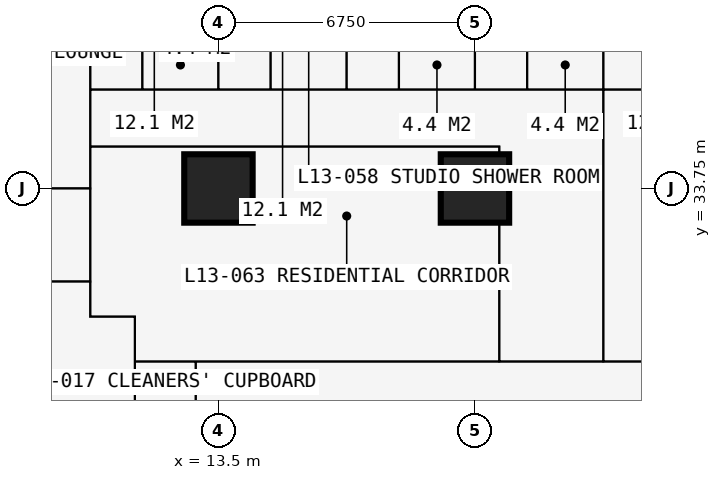
"""IFC4 building model, lengths in metres.
Left out: names, types, materials, properties, quantities, classifications, styles, units other than length and angle.
Written with IfcOpenShell. Run it as: python <this file> out.ifc"""

import sys

from ifc_helpers import new_model, si_unit, direction, frame, frame_2d, origin, origin_2d, place, context, subcontext, project, spatial, rectangle, extrude, element, fill, save


model = new_model("IFC4")
c1 = context("Model", 3, precision=1e-05, world=origin(), true_north=direction((0.0, 1.0)))
c2 = subcontext(c1, "Body", "Model", "MODEL_VIEW")
j1 = project(units=[si_unit("LENGTHUNIT", "METRE"), si_unit("PLANEANGLEUNIT", "RADIAN")], contexts=[c1])
p1 = place(None, origin())
s1 = spatial("IfcSite", under=j1, at=p1, CompositionType="ELEMENT")
p2 = place(p1, origin())
s2 = spatial("IfcBuilding", under=s1, at=p2, CompositionType="ELEMENT")
p3 = place(p2, frame((0.0, 0.0, 50.4)))
s3 = spatial("IfcBuildingStorey", under=s2, at=p3, CompositionType="ELEMENT", Elevation=50.4)
for number, where, z_axis, x_axis in (
    (1, (13.5, 33.75, 0.0), (0.0, 0.0, 1.0), (1.0, 0.0, 0.0)),
    (2, (20.25, 33.75, 0.0), (0.0, 0.0, 1.0), (1.0, 0.0, 0.0)),
):
    element("IfcColumn", number, at=place(p3, frame(where, z_axis=z_axis, x_axis=x_axis)), inside=s3, PredefinedType="COLUMN", context=c2, shape_type="SweptSolid", body=[
        extrude(rectangle(XDim=1.8, YDim=1.8, at=origin_2d()), origin(), (0.0, 0.0, 1.0), 3.6),
    ])
p4 = place(p3, frame((-0.734, 33.75, 0.0), z_axis=(0.0, 0.0, 1.0), x_axis=(1.0, 0.0, 0.0)))
e3 = element("IfcWall", 3, at=p4, inside=s3, PredefinedType="PARTITIONING", context=c2, shape_type="SweptSolid", body=[
    extrude(rectangle(XDim=10.859, YDim=0.15, at=frame_2d((5.429, 0.0))), origin(), (0.0, 0.0, 1.0), 2.877),
])
p5 = place(p3, frame((5.65, 31.3, 0.0), z_axis=(0.0, 0.0, 1.0), x_axis=(1.0, 0.0, 0.0)))
e4 = element("IfcWall", 4, at=p5, inside=s3, PredefinedType="PARTITIONING", context=c2, shape_type="SweptSolid", body=[
    extrude(rectangle(XDim=4.475, YDim=0.15, at=frame_2d((2.238, 0.0))), origin(), (0.0, 0.0, 1.0), 3.375),
])
p6 = place(p3, frame((10.125, 30.375, 0.0), z_axis=(0.0, 0.0, 1.0), x_axis=(0.0, 1.0, 0.0)))
e5 = element("IfcWall", 5, at=p6, inside=s3, PredefinedType="PARTITIONING", context=c2, shape_type="SweptSolid", body=[
    extrude(rectangle(XDim=10.859, YDim=0.15, at=frame_2d((5.429, 0.0))), origin(), (0.0, 0.0, 1.0), 3.375),
])
p7 = place(p6, frame((4.725, 0.0, 0.0)))
e6 = element("IfcOpeningElement", 6, at=p7, cuts=e5, PredefinedType="OPENING", context=c2, shape_type="SweptSolid", body=[
    extrude(rectangle(XDim=1.0, YDim=2.2, at=frame_2d((0.5, 1.1))), frame((0.0, 0.085, 0.0), z_axis=(0.0, -1.0, 0.0), x_axis=(1.0, 0.0, 0.0)), (0.0, 0.0, 1.0), 0.17),
])
p8 = place(p3, frame((10.125, 30.375, 0.0), z_axis=(0.0, 0.0, 1.0), x_axis=(1.0, 0.0, 0.0)))
e7 = element("IfcWall", 7, at=p8, inside=s3, PredefinedType="PARTITIONING", context=c2, shape_type="SweptSolid", body=[
    extrude(rectangle(XDim=1.175, YDim=0.15, at=frame_2d((0.587, 0.0))), origin(), (0.0, 0.0, 1.0), 3.375),
])
p9 = place(p3, frame((10.125, 34.85, 0.0), z_axis=(0.0, 0.0, 1.0), x_axis=(1.0, 0.0, 0.0)))
e8 = element("IfcWall", 8, at=p9, inside=s3, PredefinedType="PARTITIONING", context=c2, shape_type="SweptSolid", body=[
    extrude(rectangle(XDim=10.762, YDim=0.15, at=frame_2d((5.381, 0.0))), origin(), (0.0, 0.0, 1.0), 3.375),
])
p10 = place(p9, frame((4.9, 0.0, 0.0)))
e9 = element("IfcOpeningElement", 9, at=p10, cuts=e8, PredefinedType="OPENING", context=c2, shape_type="SweptSolid", body=[
    extrude(rectangle(XDim=0.95, YDim=2.2, at=frame_2d((0.475, 1.1))), frame((0.0, 0.085, 0.0), z_axis=(0.0, -1.0, 0.0), x_axis=(1.0, 0.0, 0.0)), (0.0, 0.0, 1.0), 0.17),
])
p11 = place(p3, frame((10.125, 36.35, 0.0), z_axis=(0.0, 0.0, 1.0), x_axis=(1.0, 0.0, 0.0)))
e10 = element("IfcWall", 10, at=p11, inside=s3, PredefinedType="PARTITIONING", context=c2, shape_type="SweptSolid", body=[
    extrude(rectangle(XDim=23.625, YDim=0.1, at=frame_2d((11.812, 0.0))), origin(), (0.0, 0.0, 1.0), 3.375),
])
p12 = place(p11, frame((21.45, 0.0, 0.0)))
e11 = element("IfcOpeningElement", 11, at=p12, cuts=e10, PredefinedType="OPENING", context=c2, shape_type="SweptSolid", body=[
    extrude(rectangle(XDim=1.0, YDim=2.2, at=frame_2d((0.5, 1.1))), frame((0.0, 0.06, 0.0), z_axis=(0.0, -1.0, 0.0), x_axis=(1.0, 0.0, 0.0)), (0.0, 0.0, 1.0), 0.12),
])
p13 = place(p11, frame((17.125, 0.0, 0.0)))
e12 = element("IfcOpeningElement", 12, at=p13, cuts=e10, PredefinedType="OPENING", context=c2, shape_type="SweptSolid", body=[
    extrude(rectangle(XDim=0.95, YDim=2.2, at=frame_2d((0.475, 1.1))), frame((0.0, 0.06, 0.0), z_axis=(0.0, -1.0, 0.0), x_axis=(1.0, 0.0, 0.0)), (0.0, 0.0, 1.0), 0.12),
])
p14 = place(p11, frame((13.7, 0.0, 0.0)))
e13 = element("IfcOpeningElement", 13, at=p14, cuts=e10, PredefinedType="OPENING", context=c2, shape_type="SweptSolid", body=[
    extrude(rectangle(XDim=0.95, YDim=2.2, at=frame_2d((0.475, 1.1))), frame((0.0, 0.06, 0.0), z_axis=(0.0, -1.0, 0.0), x_axis=(1.0, 0.0, 0.0)), (0.0, 0.0, 1.0), 0.12),
])
p15 = place(p11, frame((0.2, 0.0, 0.0)))
e14 = element("IfcOpeningElement", 14, at=p15, cuts=e10, PredefinedType="OPENING", context=c2, shape_type="SweptSolid", body=[
    extrude(rectangle(XDim=0.95, YDim=2.2, at=frame_2d((0.475, 1.1))), frame((0.0, 0.06, 0.0), z_axis=(0.0, -1.0, 0.0), x_axis=(1.0, 0.0, 0.0)), (0.0, 0.0, 1.0), 0.12),
])
p16 = place(p11, frame((3.625, 0.0, 0.0)))
e15 = element("IfcOpeningElement", 15, at=p16, cuts=e10, PredefinedType="OPENING", context=c2, shape_type="SweptSolid", body=[
    extrude(rectangle(XDim=0.95, YDim=2.2, at=frame_2d((0.475, 1.1))), frame((0.0, 0.06, 0.0), z_axis=(0.0, -1.0, 0.0), x_axis=(1.0, 0.0, 0.0)), (0.0, 0.0, 1.0), 0.12),
])
p17 = place(p11, frame((7.0, 0.0, 0.0)))
e16 = element("IfcOpeningElement", 16, at=p17, cuts=e10, PredefinedType="OPENING", context=c2, shape_type="SweptSolid", body=[
    extrude(rectangle(XDim=0.95, YDim=2.2, at=frame_2d((0.475, 1.1))), frame((0.0, 0.06, 0.0), z_axis=(0.0, -1.0, 0.0), x_axis=(1.0, 0.0, 0.0)), (0.0, 0.0, 1.0), 0.12),
])
p18 = place(p11, frame((10.375, 0.0, 0.0)))
e17 = element("IfcOpeningElement", 17, at=p18, cuts=e10, PredefinedType="OPENING", context=c2, shape_type="SweptSolid", body=[
    extrude(rectangle(XDim=0.95, YDim=2.2, at=frame_2d((0.475, 1.1))), frame((0.0, 0.06, 0.0), z_axis=(0.0, -1.0, 0.0), x_axis=(1.0, 0.0, 0.0)), (0.0, 0.0, 1.0), 0.12),
])
p19 = place(p3, frame((11.3, 11.3, 0.0), z_axis=(0.0, 0.0, 1.0), x_axis=(0.0, 1.0, 0.0)))
e18 = element("IfcWall", 18, at=p19, inside=s3, PredefinedType="PARTITIONING", context=c2, shape_type="SweptSolid", body=[
    extrude(rectangle(XDim=19.075, YDim=0.15, at=frame_2d((9.538, 0.0))), origin(), (0.0, 0.0, 1.0), 3.375),
])
p20 = place(p19, frame((10.137, 0.0, 0.0)))
e19 = element("IfcOpeningElement", 19, at=p20, cuts=e18, PredefinedType="OPENING", context=c2, shape_type="SweptSolid", body=[
    extrude(rectangle(XDim=1.0, YDim=2.2, at=frame_2d((0.5, 1.1))), frame((0.0, 0.085, 0.0), z_axis=(0.0, -1.0, 0.0), x_axis=(1.0, 0.0, 0.0)), (0.0, 0.0, 1.0), 0.17),
])
p21 = place(p3, frame((11.3, 29.2, 0.0), z_axis=(0.0, 0.0, 1.0), x_axis=(1.0, 0.0, 0.0)))
e20 = element("IfcWall", 20, at=p21, inside=s3, PredefinedType="PARTITIONING", context=c2, shape_type="SweptSolid", body=[
    extrude(rectangle(XDim=19.075, YDim=0.15, at=frame_2d((9.538, 0.0))), origin(), (0.0, 0.0, 1.0), 3.375),
])
p22 = place(p21, frame((12.875, 0.0, 0.0)))
e21 = element("IfcOpeningElement", 21, at=p22, cuts=e20, PredefinedType="OPENING", context=c2, shape_type="SweptSolid", body=[
    extrude(rectangle(XDim=1.0, YDim=2.2, at=frame_2d((0.5, 1.1))), frame((0.0, 0.085, 0.0), z_axis=(0.0, -1.0, 0.0), x_axis=(1.0, 0.0, 0.0)), (0.0, 0.0, 1.0), 0.17),
])
p23 = place(p21, frame((10.438, 0.0, 0.0)))
e22 = element("IfcOpeningElement", 22, at=p23, cuts=e20, PredefinedType="OPENING", context=c2, shape_type="SweptSolid", body=[
    extrude(rectangle(XDim=1.0, YDim=2.2, at=frame_2d((0.5, 1.1))), frame((0.0, 0.085, 0.0), z_axis=(0.0, -1.0, 0.0), x_axis=(1.0, 0.0, 0.0)), (0.0, 0.0, 1.0), 0.17),
])
p24 = place(p21, frame((15.675, 0.0, 0.0)))
e23 = element("IfcOpeningElement", 23, at=p24, cuts=e20, PredefinedType="OPENING", context=c2, shape_type="SweptSolid", body=[
    extrude(rectangle(XDim=0.95, YDim=2.2, at=frame_2d((0.475, 1.1))), frame((0.0, 0.085, 0.0), z_axis=(0.0, -1.0, 0.0), x_axis=(1.0, 0.0, 0.0)), (0.0, 0.0, 1.0), 0.17),
])
p25 = place(p3, frame((11.5, 36.35, 0.0), z_axis=(0.0, 0.0, 1.0), x_axis=(0.0, 1.0, 0.0)))
e24 = element("IfcWall", 24, at=p25, inside=s3, PredefinedType="PARTITIONING", context=c2, shape_type="SweptSolid", body=[
    extrude(rectangle(XDim=2.2, YDim=0.1, at=frame_2d((1.1, 0.0))), origin(), (0.0, 0.0, 1.0), 3.375),
])
p26 = place(p25, frame((0.65, 0.0, 0.0)))
e25 = element("IfcOpeningElement", 25, at=p26, cuts=e24, PredefinedType="OPENING", context=c2, shape_type="SweptSolid", body=[
    extrude(rectangle(XDim=0.9, YDim=2.2, at=frame_2d((0.45, 1.1))), frame((0.0, 0.06, 0.0), z_axis=(0.0, -1.0, 0.0), x_axis=(1.0, 0.0, 0.0)), (0.0, 0.0, 1.0), 0.12),
])
p27 = place(p3, frame((12.9, 27.6, 0.0), z_axis=(0.0, 0.0, 1.0), x_axis=(0.0, 1.0, 0.0)))
e26 = element("IfcWall", 26, at=p27, inside=s3, PredefinedType="PARTITIONING", context=c2, shape_type="SweptSolid", body=[
    extrude(rectangle(XDim=1.6, YDim=0.15, at=frame_2d((0.8, 0.0))), origin(), (0.0, 0.0, 1.0), 3.375),
])
p28 = place(p3, frame((13.5, 36.35, 0.0), z_axis=(0.0, 0.0, 1.0), x_axis=(0.0, 1.0, 0.0)))
e27 = element("IfcWall", 27, at=p28, inside=s3, PredefinedType="PARTITIONING", context=c2, shape_type="SweptSolid", body=[
    extrude(rectangle(XDim=4.884, YDim=0.175, at=frame_2d((2.442, 0.0))), origin(), (0.0, 0.0, 1.0), 2.61),
])
p29 = place(p3, frame((14.875, 36.35, 0.0), z_axis=(0.0, 0.0, 1.0), x_axis=(0.0, 1.0, 0.0)))
e28 = element("IfcWall", 28, at=p29, inside=s3, PredefinedType="PARTITIONING", context=c2, shape_type="SweptSolid", body=[
    extrude(rectangle(XDim=2.2, YDim=0.1, at=frame_2d((1.1, 0.0))), origin(), (0.0, 0.0, 1.0), 3.375),
])
p30 = place(p29, frame((0.65, 0.0, 0.0)))
e29 = element("IfcOpeningElement", 29, at=p30, cuts=e28, PredefinedType="OPENING", context=c2, shape_type="SweptSolid", body=[
    extrude(rectangle(XDim=0.9, YDim=2.2, at=frame_2d((0.45, 1.1))), frame((0.0, 0.06, 0.0), z_axis=(0.0, -1.0, 0.0), x_axis=(1.0, 0.0, 0.0)), (0.0, 0.0, 1.0), 0.12),
])
p31 = place(p3, frame((16.875, 36.35, 0.0), z_axis=(0.0, 0.0, 1.0), x_axis=(0.0, 1.0, 0.0)))
e30 = element("IfcWall", 30, at=p31, inside=s3, PredefinedType="PARTITIONING", context=c2, shape_type="SweptSolid", body=[
    extrude(rectangle(XDim=4.884, YDim=0.175, at=frame_2d((2.442, 0.0))), origin(), (0.0, 0.0, 1.0), 3.375),
])
p32 = place(p3, frame((18.25, 36.35, 0.0), z_axis=(0.0, 0.0, 1.0), x_axis=(0.0, 1.0, 0.0)))
e31 = element("IfcWall", 31, at=p32, inside=s3, PredefinedType="PARTITIONING", context=c2, shape_type="SweptSolid", body=[
    extrude(rectangle(XDim=2.2, YDim=0.1, at=frame_2d((1.1, 0.0))), origin(), (0.0, 0.0, 1.0), 3.375),
])
p33 = place(p32, frame((0.65, 0.0, 0.0)))
e32 = element("IfcOpeningElement", 32, at=p33, cuts=e31, PredefinedType="OPENING", context=c2, shape_type="SweptSolid", body=[
    extrude(rectangle(XDim=0.9, YDim=2.2, at=frame_2d((0.45, 1.1))), frame((0.0, 0.06, 0.0), z_axis=(0.0, -1.0, 0.0), x_axis=(1.0, 0.0, 0.0)), (0.0, 0.0, 1.0), 0.12),
])
p34 = place(p3, frame((20.25, 36.35, 0.0), z_axis=(0.0, 0.0, 1.0), x_axis=(0.0, 1.0, 0.0)))
e33 = element("IfcWall", 33, at=p34, inside=s3, PredefinedType="PARTITIONING", context=c2, shape_type="SweptSolid", body=[
    extrude(rectangle(XDim=4.884, YDim=0.175, at=frame_2d((2.442, 0.0))), origin(), (0.0, 0.0, 1.0), 2.61),
])
p35 = place(p3, frame((20.887, 29.2, 0.0), z_axis=(0.0, 0.0, 1.0), x_axis=(0.0, 1.0, 0.0)))
e34 = element("IfcWall", 34, at=p35, inside=s3, PredefinedType="PARTITIONING", context=c2, shape_type="SweptSolid", body=[
    extrude(rectangle(XDim=5.65, YDim=0.15, at=frame_2d((2.825, 0.0))), origin(), (0.0, 0.0, 1.0), 3.375),
])
p36 = place(p3, frame((21.625, 36.35, 0.0), z_axis=(0.0, 0.0, 1.0), x_axis=(0.0, 1.0, 0.0)))
e35 = element("IfcWall", 35, at=p36, inside=s3, PredefinedType="PARTITIONING", context=c2, shape_type="SweptSolid", body=[
    extrude(rectangle(XDim=2.2, YDim=0.1, at=frame_2d((1.1, 0.0))), origin(), (0.0, 0.0, 1.0), 3.375),
])
p37 = place(p36, frame((0.65, 0.0, 0.0)))
e36 = element("IfcOpeningElement", 36, at=p37, cuts=e35, PredefinedType="OPENING", context=c2, shape_type="SweptSolid", body=[
    extrude(rectangle(XDim=0.9, YDim=2.2, at=frame_2d((0.45, 1.1))), frame((0.0, 0.06, 0.0), z_axis=(0.0, -1.0, 0.0), x_axis=(1.0, 0.0, 0.0)), (0.0, 0.0, 1.0), 0.12),
])
p38 = place(p3, frame((23.625, 29.2, 0.0), z_axis=(0.0, 0.0, 1.0), x_axis=(0.0, 1.0, 0.0)))
e37 = element("IfcWall", 37, at=p38, inside=s3, PredefinedType="PARTITIONING", context=c2, shape_type="SweptSolid", body=[
    extrude(rectangle(XDim=12.034, YDim=0.15, at=frame_2d((6.017, 0.0))), origin(), (0.0, 0.0, 1.0), 3.375),
])
p39 = place(p14, origin())
e38 = element("IfcDoor", 38, at=p39, inside=s3, OperationType="SINGLE_SWING_LEFT", PredefinedType="DOOR", context=c2, shape_type="SweptSolid", body=[
    extrude(rectangle(XDim=0.95, YDim=2.2, at=frame_2d((0.475, 1.1))), frame((0.0, 0.025, 0.0), z_axis=(0.0, -1.0, 0.0), x_axis=(1.0, 0.0, 0.0)), (0.0, 0.0, 1.0), 0.05),
])
fill(e13, e38)
p40 = place(p22, origin())
e39 = element("IfcDoor", 39, at=p40, inside=s3, OperationType="SINGLE_SWING_LEFT", PredefinedType="DOOR", context=c2, shape_type="SweptSolid", body=[
    extrude(rectangle(XDim=1.0, YDim=2.2, at=frame_2d((0.5, 1.1))), frame((0.0, 0.025, 0.0), z_axis=(0.0, -1.0, 0.0), x_axis=(1.0, 0.0, 0.0)), (0.0, 0.0, 1.0), 0.05),
])
fill(e21, e39)
p41 = place(p15, origin())
e40 = element("IfcDoor", 40, at=p41, inside=s3, OperationType="SINGLE_SWING_LEFT", PredefinedType="DOOR", context=c2, shape_type="SweptSolid", body=[
    extrude(rectangle(XDim=0.95, YDim=2.2, at=frame_2d((0.475, 1.1))), frame((0.0, 0.025, 0.0), z_axis=(0.0, -1.0, 0.0), x_axis=(1.0, 0.0, 0.0)), (0.0, 0.0, 1.0), 0.05),
])
fill(e14, e40)
p42 = place(p26, origin())
e41 = element("IfcDoor", 41, at=p42, inside=s3, OperationType="SINGLE_SWING_RIGHT", PredefinedType="DOOR", context=c2, shape_type="SweptSolid", body=[
    extrude(rectangle(XDim=0.9, YDim=2.2, at=frame_2d((0.45, 1.1))), frame((0.0, 0.025, 0.0), z_axis=(0.0, -1.0, 0.0), x_axis=(1.0, 0.0, 0.0)), (0.0, 0.0, 1.0), 0.05),
])
fill(e25, e41)
p43 = place(p16, origin())
e42 = element("IfcDoor", 42, at=p43, inside=s3, OperationType="SINGLE_SWING_LEFT", PredefinedType="DOOR", context=c2, shape_type="SweptSolid", body=[
    extrude(rectangle(XDim=0.95, YDim=2.2, at=frame_2d((0.475, 1.1))), frame((0.0, 0.025, 0.0), z_axis=(0.0, -1.0, 0.0), x_axis=(1.0, 0.0, 0.0)), (0.0, 0.0, 1.0), 0.05),
])
fill(e15, e42)
p44 = place(p30, origin())
e43 = element("IfcDoor", 43, at=p44, inside=s3, OperationType="SINGLE_SWING_RIGHT", PredefinedType="DOOR", context=c2, shape_type="SweptSolid", body=[
    extrude(rectangle(XDim=0.9, YDim=2.2, at=frame_2d((0.45, 1.1))), frame((0.0, 0.025, 0.0), z_axis=(0.0, -1.0, 0.0), x_axis=(1.0, 0.0, 0.0)), (0.0, 0.0, 1.0), 0.05),
])
fill(e29, e43)
p45 = place(p17, origin())
e44 = element("IfcDoor", 44, at=p45, inside=s3, OperationType="SINGLE_SWING_LEFT", PredefinedType="DOOR", context=c2, shape_type="SweptSolid", body=[
    extrude(rectangle(XDim=0.95, YDim=2.2, at=frame_2d((0.475, 1.1))), frame((0.0, 0.025, 0.0), z_axis=(0.0, -1.0, 0.0), x_axis=(1.0, 0.0, 0.0)), (0.0, 0.0, 1.0), 0.05),
])
fill(e16, e44)
p46 = place(p33, origin())
e45 = element("IfcDoor", 45, at=p46, inside=s3, OperationType="SINGLE_SWING_RIGHT", PredefinedType="DOOR", context=c2, shape_type="SweptSolid", body=[
    extrude(rectangle(XDim=0.9, YDim=2.2, at=frame_2d((0.45, 1.1))), frame((0.0, 0.025, 0.0), z_axis=(0.0, -1.0, 0.0), x_axis=(1.0, 0.0, 0.0)), (0.0, 0.0, 1.0), 0.05),
])
fill(e32, e45)
p47 = place(p18, origin())
e46 = element("IfcDoor", 46, at=p47, inside=s3, OperationType="SINGLE_SWING_LEFT", PredefinedType="DOOR", context=c2, shape_type="SweptSolid", body=[
    extrude(rectangle(XDim=0.95, YDim=2.2, at=frame_2d((0.475, 1.1))), frame((0.0, 0.025, 0.0), z_axis=(0.0, -1.0, 0.0), x_axis=(1.0, 0.0, 0.0)), (0.0, 0.0, 1.0), 0.05),
])
fill(e17, e46)
p48 = place(p37, origin())
e47 = element("IfcDoor", 47, at=p48, inside=s3, OperationType="SINGLE_SWING_RIGHT", PredefinedType="DOOR", context=c2, shape_type="SweptSolid", body=[
    extrude(rectangle(XDim=0.9, YDim=2.2, at=frame_2d((0.45, 1.1))), frame((0.0, 0.025, 0.0), z_axis=(0.0, -1.0, 0.0), x_axis=(1.0, 0.0, 0.0)), (0.0, 0.0, 1.0), 0.05),
])
fill(e36, e47)
p49 = place(p23, origin())
e48 = element("IfcDoor", 48, at=p49, inside=s3, OperationType="SINGLE_SWING_LEFT", PredefinedType="DOOR", context=c2, shape_type="SweptSolid", body=[
    extrude(rectangle(XDim=1.0, YDim=2.2, at=frame_2d((0.5, 1.1))), frame((0.0, 0.025, 0.0), z_axis=(0.0, -1.0, 0.0), x_axis=(1.0, 0.0, 0.0)), (0.0, 0.0, 1.0), 0.05),
])
fill(e22, e48)
p50 = place(p10, origin())
e49 = element("IfcDoor", 49, at=p50, inside=s3, OperationType="SINGLE_SWING_LEFT", PredefinedType="DOOR", context=c2, shape_type="SweptSolid", body=[
    extrude(rectangle(XDim=0.95, YDim=2.2, at=frame_2d((0.475, 1.1))), frame((0.0, 0.025, 0.0), z_axis=(0.0, -1.0, 0.0), x_axis=(1.0, 0.0, 0.0)), (0.0, 0.0, 1.0), 0.05),
])
fill(e9, e49)
p51 = place(p7, origin())
e50 = element("IfcDoor", 50, at=p51, inside=s3, OperationType="SINGLE_SWING_LEFT", PredefinedType="DOOR", context=c2, shape_type="SweptSolid", body=[
    extrude(rectangle(XDim=1.0, YDim=2.2, at=frame_2d((0.5, 1.1))), frame((0.0, 0.025, 0.0), z_axis=(0.0, -1.0, 0.0), x_axis=(1.0, 0.0, 0.0)), (0.0, 0.0, 1.0), 0.05),
])
fill(e6, e50)
save(model, sys.argv[1])
